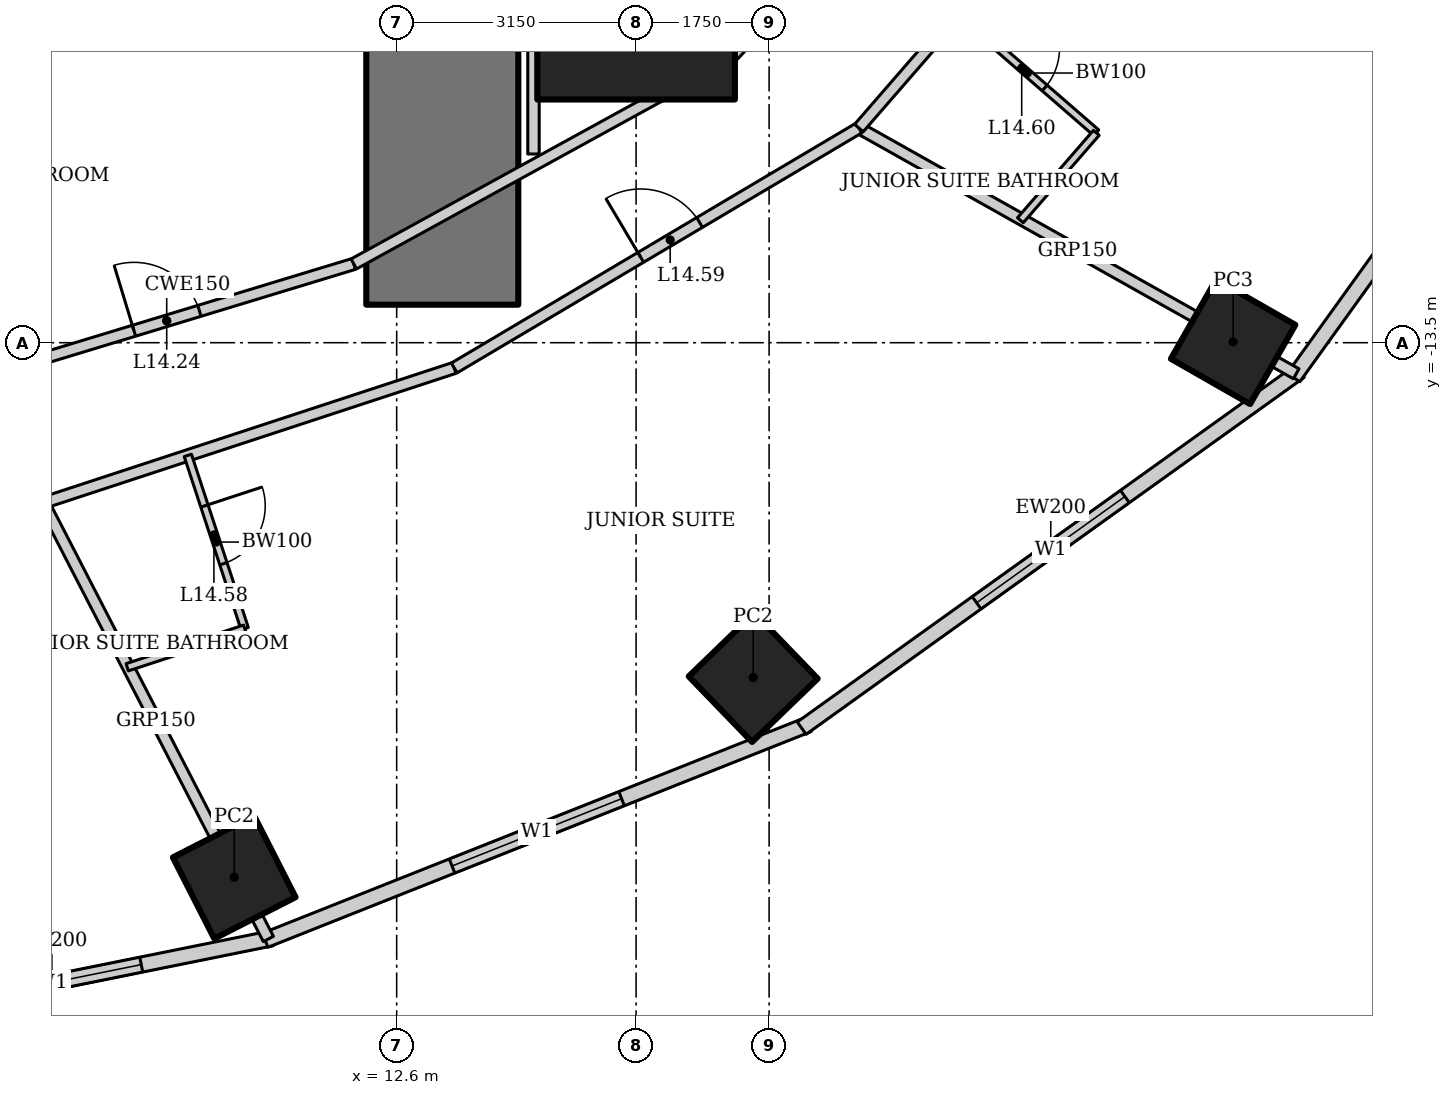
"""IFC4 building model, lengths in metres.
Left out: names, types, materials, properties, quantities, classifications, styles, units other than length and angle.
Written with IfcOpenShell. Run it as: python <this file> out.ifc"""

import sys

from ifc_helpers import new_model, si_unit, direction, frame, frame_2d, origin, origin_2d, place, context, subcontext, project, spatial, rectangle, hollow_rectangle, extrude, element, fill, save


model = new_model("IFC4")
c1 = context("Model", 3, precision=1e-05, world=origin(), true_north=direction((0.0, 1.0)))
c2 = subcontext(c1, "Body", "Model", "MODEL_VIEW")
j1 = project(units=[si_unit("LENGTHUNIT", "METRE"), si_unit("PLANEANGLEUNIT", "RADIAN")], contexts=[c1])
p1 = place(None, origin())
s1 = spatial("IfcSite", under=j1, at=p1, CompositionType="ELEMENT")
p2 = place(p1, origin())
s2 = spatial("IfcBuilding", under=s1, at=p2, CompositionType="ELEMENT")
p3 = place(p2, frame((0.0, 0.0, 65.8)))
s3 = spatial("IfcBuildingStorey", under=s2, at=p3, CompositionType="ELEMENT", Elevation=65.8)
p4 = place(p3, frame((15.75, -9.0, 0.0), z_axis=(0.0, 0.0, 1.0), x_axis=(1.0, 0.0, 0.0)))
e1 = element("IfcColumn", 1, at=p4, inside=s3, PredefinedType="COLUMN", context=c2, shape_type="SweptSolid", body=[
    extrude(hollow_rectangle(XDim=2.6, YDim=2.6, WallThickness=0.13, at=origin_2d()), origin(), (0.0, 0.0, 1.0), 3.6),
])
for number, where, z_axis, x_axis in (
    (2, (10.463, -20.534, 0.0), (0.0, 0.0, 1.0), (0.891, 0.454, 0.0)),
    (3, (17.291, -17.905, 0.0), (0.0, 0.0, 1.0), (0.719, 0.695, 0.0)),
):
    element("IfcColumn", number, at=place(p3, frame(where, z_axis=z_axis, x_axis=x_axis)), inside=s3, PredefinedType="COLUMN", context=c2, shape_type="SweptSolid", body=[
        extrude(hollow_rectangle(XDim=1.2, YDim=1.2, WallThickness=0.1, at=origin_2d()), origin(), (0.0, 0.0, 1.0), 3.6),
    ])
p5 = place(p3, frame((23.605, -13.489, 0.0), z_axis=(0.0, 0.0, 1.0), x_axis=(0.496139221777, 0.86824298017, 0.0)))
e4 = element("IfcColumn", 4, at=p5, inside=s3, PredefinedType="COLUMN", context=c2, shape_type="SweptSolid", body=[
    extrude(hollow_rectangle(XDim=1.2, YDim=1.2, WallThickness=0.12, at=origin_2d()), origin(), (0.0, 0.0, 1.0), 3.6),
])
p6 = place(p3, frame((13.2, -13.0, 0.0), z_axis=(0.0, 0.0, 1.0), x_axis=(0.0, 1.0, 0.0)))
e5 = element("IfcWall", 5, at=p6, inside=s3, PredefinedType="SHEAR", context=c2, shape_type="SweptSolid", body=[
    extrude(rectangle(XDim=26.0, YDim=2.0, at=frame_2d((13.0, 0.0))), origin(), (0.0, 0.0, 1.0), 3.6),
])
p7 = place(p6, frame((12.1, 0.0, 0.0)))
e6 = element("IfcOpeningElement", 6, at=p7, cuts=e5, PredefinedType="OPENING", context=c2, shape_type="SweptSolid", body=[
    extrude(rectangle(XDim=1.8, YDim=2.1, at=frame_2d((0.9, 1.05))), frame((0.0, 1.01, 0.0), z_axis=(0.0, -1.0, 0.0), x_axis=(1.0, 0.0, 0.0)), (0.0, 0.0, 1.0), 2.02),
])
p8 = place(p3, frame((5.17, -22.504, 0.0), z_axis=(0.0, 0.0, 1.0), x_axis=(0.980251657452, 0.197754110105, 0.0)))
e7 = element("IfcWall", 7, at=p8, inside=s3, PredefinedType="SOLIDWALL", context=c2, shape_type="SweptSolid", body=[
    extrude(rectangle(XDim=5.904, YDim=0.2, at=frame_2d((2.952, 0.0))), origin(), (0.0, 0.0, 1.0), 3.4),
])
p9 = place(p8, frame((1.752, 0.0, 0.5)))
e8 = element("IfcOpeningElement", 8, at=p9, cuts=e7, PredefinedType="OPENING", context=c2, shape_type="SweptSolid", body=[
    extrude(rectangle(XDim=2.4, YDim=2.2, at=frame_2d((1.2, 1.1))), frame((0.0, 0.11, 0.0), z_axis=(0.0, -1.0, 0.0), x_axis=(1.0, 0.0, 0.0)), (0.0, 0.0, 1.0), 0.22),
])
p10 = place(p3, frame((10.869, -21.363, 0.0), z_axis=(0.0, 0.0, 1.0), x_axis=(0.929358351251, 0.369178892895, 0.0)))
e9 = element("IfcWall", 9, at=p10, inside=s3, PredefinedType="SOLIDWALL", context=c2, shape_type="SweptSolid", body=[
    extrude(rectangle(XDim=7.692, YDim=0.2, at=frame_2d((3.846, 0.0))), origin(), (0.0, 0.0, 1.0), 3.4),
])
p11 = place(p10, frame((2.646, 0.0, 0.5)))
e10 = element("IfcOpeningElement", 10, at=p11, cuts=e9, PredefinedType="OPENING", context=c2, shape_type="SweptSolid", body=[
    extrude(rectangle(XDim=2.4, YDim=2.2, at=frame_2d((1.2, 1.1))), frame((0.0, 0.11, 0.0), z_axis=(0.0, -1.0, 0.0), x_axis=(1.0, 0.0, 0.0)), (0.0, 0.0, 1.0), 0.22),
])
p12 = place(p3, frame((17.929, -18.572, 0.0), z_axis=(0.0, 0.0, 1.0), x_axis=(0.812791321576, 0.582554948112, 0.0)))
e11 = element("IfcWall", 11, at=p12, inside=s3, PredefinedType="SOLIDWALL", context=c2, shape_type="SweptSolid", body=[
    extrude(rectangle(XDim=8.063, YDim=0.2, at=frame_2d((4.032, 0.0))), origin(), (0.0, 0.0, 1.0), 3.4),
])
p13 = place(p12, frame((2.832, 0.0, 0.5)))
e12 = element("IfcOpeningElement", 12, at=p13, cuts=e11, PredefinedType="OPENING", context=c2, shape_type="SweptSolid", body=[
    extrude(rectangle(XDim=2.4, YDim=2.2, at=frame_2d((1.2, 1.1))), frame((0.0, 0.11, 0.0), z_axis=(0.0, -1.0, 0.0), x_axis=(1.0, 0.0, 0.0)), (0.0, 0.0, 1.0), 0.22),
])
p14 = place(p3, frame((24.4, -13.957, 0.0), z_axis=(0.0, 0.0, 1.0), x_axis=(0.583937613703, 0.811798536155, 0.0)))
e13 = element("IfcWall", 13, at=p14, inside=s3, PredefinedType="SOLIDWALL", context=c2, shape_type="SweptSolid", body=[
    extrude(rectangle(XDim=8.323, YDim=0.2, at=frame_2d((4.162, 0.0))), origin(), (0.0, 0.0, 1.0), 3.4),
])
p15 = place(p14, frame((2.961, 0.0, 0.5)))
e14 = element("IfcOpeningElement", 14, at=p15, cuts=e13, PredefinedType="OPENING", context=c2, shape_type="SweptSolid", body=[
    extrude(rectangle(XDim=2.4, YDim=2.2, at=frame_2d((1.2, 1.1))), frame((0.0, 0.11, 0.0), z_axis=(0.0, -1.0, 0.0), x_axis=(1.0, 0.0, 0.0)), (0.0, 0.0, 1.0), 0.22),
])
p16 = place(p3, frame((10.912, -21.346, 0.0), z_axis=(0.0, 0.0, 1.0), x_axis=(-0.458384799126, 0.888753833145, 0.0)))
e15 = element("IfcWall", 15, at=p16, inside=s3, PredefinedType="PARTITIONING", context=c2, shape_type="SweptSolid", body=[
    extrude(rectangle(XDim=6.457, YDim=0.15, at=frame_2d((3.229, 0.0))), origin(), (0.0, 0.0, 1.0), 2.528),
])
p17 = place(p3, frame((24.435, -13.909, 0.0), z_axis=(0.0, 0.0, 1.0), x_axis=(-0.871747379892, 0.489955616001, 0.0)))
e16 = element("IfcWall", 16, at=p17, inside=s3, PredefinedType="PARTITIONING", context=c2, shape_type="SweptSolid", body=[
    extrude(rectangle(XDim=6.6, YDim=0.15, at=frame_2d((3.3, 0.0))), origin(), (0.0, 0.0, 1.0), 2.693),
])
p18 = place(p3, frame((7.952, -15.607, 0.0), z_axis=(0.0, 0.0, 1.0), x_axis=(0.950106803111, 0.311924770869, 0.0)))
e17 = element("IfcWall", 17, at=p18, inside=s3, PredefinedType="PARTITIONING", context=c2, shape_type="SweptSolid", body=[
    extrude(rectangle(XDim=5.689, YDim=0.15, at=frame_2d((2.845, 0.0))), origin(), (0.0, 0.0, 1.0), 3.45),
])
p19 = place(p3, frame((13.357, -13.832, 0.0), z_axis=(0.0, 0.0, 1.0), x_axis=(0.860147339762, 0.510045639036, 0.0)))
e18 = element("IfcWall", 18, at=p19, inside=s3, PredefinedType="PARTITIONING", context=c2, shape_type="SweptSolid", body=[
    extrude(rectangle(XDim=6.19, YDim=0.15, at=frame_2d((3.095, 0.0))), origin(), (0.0, 0.0, 1.0), 3.45),
])
p20 = place(p19, frame((2.853, 0.0, 0.0)))
e19 = element("IfcOpeningElement", 19, at=p20, cuts=e18, PredefinedType="OPENING", context=c2, shape_type="SweptSolid", body=[
    extrude(rectangle(XDim=0.9, YDim=2.1, at=frame_2d((0.45, 1.05))), frame((0.0, 0.085, 0.0), z_axis=(0.0, -1.0, 0.0), x_axis=(1.0, 0.0, 0.0)), (0.0, 0.0, 1.0), 0.17),
])
p21 = place(p3, frame((18.681, -10.675, 0.0), z_axis=(0.0, 0.0, 1.0), x_axis=(0.655599989166, 0.755108372491, 0.0)))
e20 = element("IfcWall", 20, at=p21, inside=s3, PredefinedType="PARTITIONING", context=c2, shape_type="SweptSolid", body=[
    extrude(rectangle(XDim=6.551, YDim=0.15, at=frame_2d((3.275, 0.0))), origin(), (0.0, 0.0, 1.0), 3.45),
])
p22 = place(p3, frame((7.113, -13.96, 0.0), z_axis=(0.0, 0.0, 1.0), x_axis=(0.956795045135, 0.290763205385, 0.0)))
e21 = element("IfcWall", 21, at=p22, inside=s3, PredefinedType="PARTITIONING", context=c2, shape_type="SweptSolid", body=[
    extrude(rectangle(XDim=5.146, YDim=0.15, at=frame_2d((2.573, 0.0))), origin(), (0.0, 0.0, 1.0), 3.45),
])
p23 = place(p22, frame((2.123, 0.0, 0.0)))
e22 = element("IfcOpeningElement", 22, at=p23, cuts=e21, PredefinedType="OPENING", context=c2, shape_type="SweptSolid", body=[
    extrude(rectangle(XDim=0.9, YDim=2.1, at=frame_2d((0.45, 1.05))), frame((0.0, 0.085, 0.0), z_axis=(0.0, -1.0, 0.0), x_axis=(1.0, 0.0, 0.0)), (0.0, 0.0, 1.0), 0.17),
])
p24 = place(p3, frame((12.036, -12.464, 0.0), z_axis=(0.0, 0.0, 1.0), x_axis=(0.876522084062, 0.481361647986, 0.0)))
e23 = element("IfcWall", 23, at=p24, inside=s3, PredefinedType="PARTITIONING", context=c2, shape_type="SweptSolid", body=[
    extrude(rectangle(XDim=5.687, YDim=0.15, at=frame_2d((2.844, 0.0))), origin(), (0.0, 0.0, 1.0), 3.45),
])
p25 = place(p3, frame((17.021, -9.726, 0.0), z_axis=(0.0, 0.0, 1.0), x_axis=(0.68365836236, 0.729802194828, 0.0)))
e24 = element("IfcWall", 24, at=p25, inside=s3, PredefinedType="PARTITIONING", context=c2, shape_type="SweptSolid", body=[
    extrude(rectangle(XDim=6.09, YDim=0.15, at=frame_2d((3.045, 0.0))), origin(), (0.0, 0.0, 1.0), 3.45),
])
p26 = place(p25, frame((2.545, 0.0, 0.0)))
e25 = element("IfcOpeningElement", 25, at=p26, cuts=e24, PredefinedType="OPENING", context=c2, shape_type="SweptSolid", body=[
    extrude(rectangle(XDim=1.0, YDim=2.1, at=frame_2d((0.5, 1.05))), frame((0.0, 0.085, 0.0), z_axis=(0.0, -1.0, 0.0), x_axis=(1.0, 0.0, 0.0)), (0.0, 0.0, 1.0), 0.17),
])
p27 = place(p3, frame((14.4, -11.017, 0.0), z_axis=(0.0, 0.0, 1.0), x_axis=(0.0, 1.0, 0.0)))
e26 = element("IfcWall", 26, at=p27, inside=s3, PredefinedType="PARTITIONING", context=c2, shape_type="SweptSolid", body=[
    extrude(rectangle(XDim=10.117, YDim=0.15, at=frame_2d((5.059, 0.0))), origin(), (0.0, 0.0, 1.0), 3.45),
])
p28 = place(p3, frame((9.852, -14.983, 0.0), z_axis=(0.0, 0.0, 1.0), x_axis=(0.311890952591, -0.950117905153, 0.0)))
e27 = element("IfcWall", 27, at=p28, inside=s3, PredefinedType="PARTITIONING", context=c2, shape_type="SweptSolid", body=[
    extrude(rectangle(XDim=2.4, YDim=0.1, at=frame_2d((1.2, 0.0))), origin(), (0.0, 0.0, 1.0), 3.45),
])
p29 = place(p28, frame((0.7, 0.0, 0.0)))
e28 = element("IfcOpeningElement", 28, at=p29, cuts=e27, PredefinedType="OPENING", context=c2, shape_type="SweptSolid", body=[
    extrude(rectangle(XDim=0.8, YDim=2.1, at=frame_2d((0.4, 1.05))), frame((0.0, 0.06, 0.0), z_axis=(0.0, -1.0, 0.0), x_axis=(1.0, 0.0, 0.0)), (0.0, 0.0, 1.0), 0.12),
])
p30 = place(p3, frame((10.601, -17.263, 0.0), z_axis=(0.0, 0.0, 1.0), x_axis=(-0.950113706819, -0.311903741746, 0.0)))
e29 = element("IfcWall", 29, at=p30, inside=s3, PredefinedType="PARTITIONING", context=c2, shape_type="SweptSolid", body=[
    extrude(rectangle(XDim=1.627, YDim=0.1, at=frame_2d((0.814, 0.0))), origin(), (0.0, 0.0, 1.0), 3.45),
])
p31 = place(p3, frame((19.993, -9.165, 0.0), z_axis=(0.0, 0.0, 1.0), x_axis=(0.755098052661, -0.655611875172, 0.0)))
e30 = element("IfcWall", 30, at=p31, inside=s3, PredefinedType="PARTITIONING", context=c2, shape_type="SweptSolid", body=[
    extrude(rectangle(XDim=2.4, YDim=0.1, at=frame_2d((1.2, 0.0))), origin(), (0.0, 0.0, 1.0), 3.45),
])
p32 = place(p31, frame((0.7, 0.0, 0.0)))
e31 = element("IfcOpeningElement", 31, at=p32, cuts=e30, PredefinedType="OPENING", context=c2, shape_type="SweptSolid", body=[
    extrude(rectangle(XDim=0.8, YDim=2.1, at=frame_2d((0.4, 1.05))), frame((0.0, 0.06, 0.0), z_axis=(0.0, -1.0, 0.0), x_axis=(1.0, 0.0, 0.0)), (0.0, 0.0, 1.0), 0.12),
])
p33 = place(p3, frame((21.805, -10.738, 0.0), z_axis=(0.0, 0.0, 1.0), x_axis=(-0.655528024617, -0.755170847518, 0.0)))
e32 = element("IfcWall", 32, at=p33, inside=s3, PredefinedType="PARTITIONING", context=c2, shape_type="SweptSolid", body=[
    extrude(rectangle(XDim=1.524, YDim=0.1, at=frame_2d((0.762, 0.0))), origin(), (0.0, 0.0, 1.0), 3.45),
])
p34 = place(p9, origin())
e33 = element("IfcWindow", 33, at=p34, inside=s3, PartitioningType="SINGLE_PANEL", PredefinedType="WINDOW", context=c2, shape_type="SweptSolid", body=[
    extrude(rectangle(XDim=2.4, YDim=2.2, at=frame_2d((1.2, 1.1))), frame((0.0, 0.03, 0.0), z_axis=(0.0, -1.0, 0.0), x_axis=(1.0, 0.0, 0.0)), (0.0, 0.0, 1.0), 0.06),
])
fill(e8, e33)
p35 = place(p11, origin())
e34 = element("IfcWindow", 34, at=p35, inside=s3, PartitioningType="SINGLE_PANEL", PredefinedType="WINDOW", context=c2, shape_type="SweptSolid", body=[
    extrude(rectangle(XDim=2.4, YDim=2.2, at=frame_2d((1.2, 1.1))), frame((0.0, 0.03, 0.0), z_axis=(0.0, -1.0, 0.0), x_axis=(1.0, 0.0, 0.0)), (0.0, 0.0, 1.0), 0.06),
])
fill(e10, e34)
p36 = place(p13, origin())
e35 = element("IfcWindow", 35, at=p36, inside=s3, PartitioningType="SINGLE_PANEL", PredefinedType="WINDOW", context=c2, shape_type="SweptSolid", body=[
    extrude(rectangle(XDim=2.4, YDim=2.2, at=frame_2d((1.2, 1.1))), frame((0.0, 0.03, 0.0), z_axis=(0.0, -1.0, 0.0), x_axis=(1.0, 0.0, 0.0)), (0.0, 0.0, 1.0), 0.06),
])
fill(e12, e35)
p37 = place(p23, origin())
e36 = element("IfcDoor", 36, at=p37, inside=s3, OperationType="SINGLE_SWING_LEFT", PredefinedType="DOOR", context=c2, shape_type="SweptSolid", body=[
    extrude(rectangle(XDim=0.9, YDim=2.1, at=frame_2d((0.45, 1.05))), frame((0.0, 0.025, 0.0), z_axis=(0.0, -1.0, 0.0), x_axis=(1.0, 0.0, 0.0)), (0.0, 0.0, 1.0), 0.05),
])
fill(e22, e36)
p38 = place(p29, origin())
e37 = element("IfcDoor", 37, at=p38, inside=s3, OperationType="SINGLE_SWING_LEFT", PredefinedType="DOOR", context=c2, shape_type="SweptSolid", body=[
    extrude(rectangle(XDim=0.8, YDim=2.1, at=frame_2d((0.4, 1.05))), frame((0.0, 0.025, 0.0), z_axis=(0.0, -1.0, 0.0), x_axis=(1.0, 0.0, 0.0)), (0.0, 0.0, 1.0), 0.05),
])
fill(e28, e37)
p39 = place(p20, origin())
e38 = element("IfcDoor", 38, at=p39, inside=s3, OperationType="SINGLE_SWING_LEFT", PredefinedType="DOOR", context=c2, shape_type="SweptSolid", body=[
    extrude(rectangle(XDim=0.9, YDim=2.1, at=frame_2d((0.45, 1.05))), frame((0.0, 0.025, 0.0), z_axis=(0.0, -1.0, 0.0), x_axis=(1.0, 0.0, 0.0)), (0.0, 0.0, 1.0), 0.05),
])
fill(e19, e38)
p40 = place(p32, origin())
e39 = element("IfcDoor", 39, at=p40, inside=s3, OperationType="SINGLE_SWING_LEFT", PredefinedType="DOOR", context=c2, shape_type="SweptSolid", body=[
    extrude(rectangle(XDim=0.8, YDim=2.1, at=frame_2d((0.4, 1.05))), frame((0.0, 0.025, 0.0), z_axis=(0.0, -1.0, 0.0), x_axis=(1.0, 0.0, 0.0)), (0.0, 0.0, 1.0), 0.05),
])
fill(e31, e39)
save(model, sys.argv[1])
